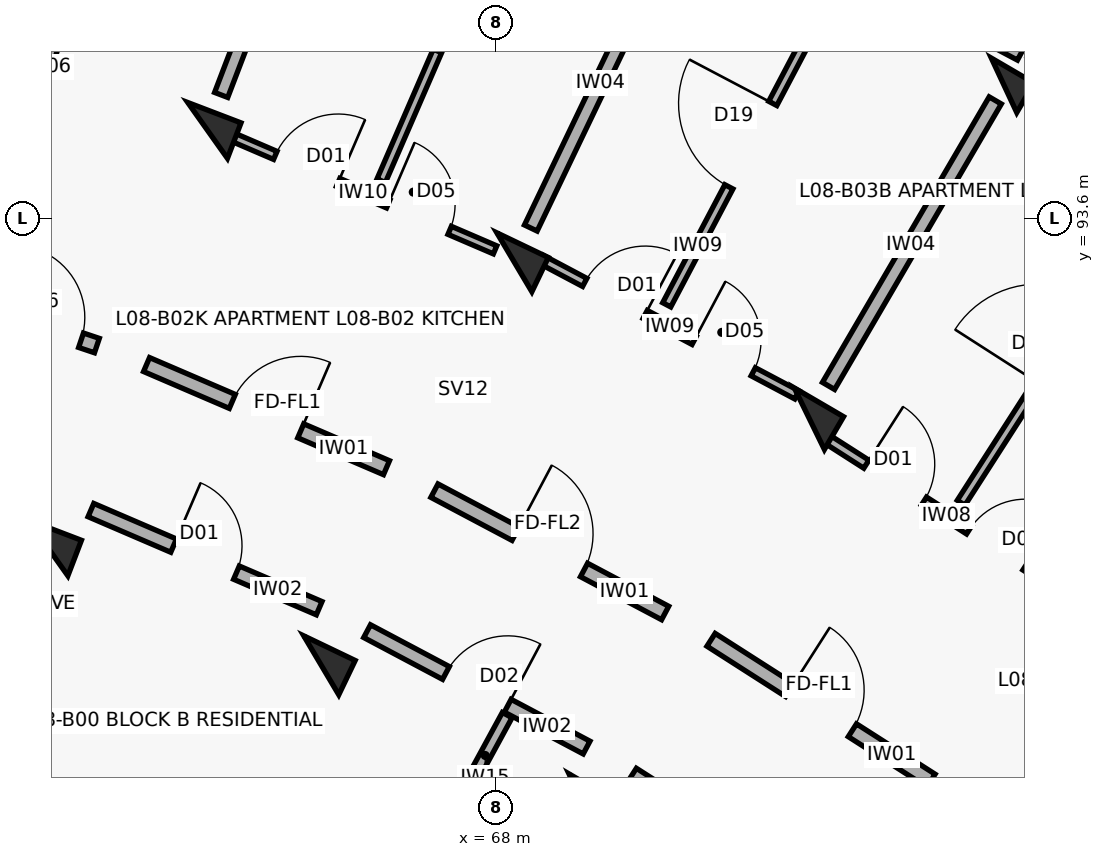
"""IFC4 building model, lengths in metres.
Left out: names, types, materials, properties, quantities, classifications, styles, units other than length and angle.
Written with IfcOpenShell. Run it as: python <this file> out.ifc"""

import sys

from ifc_helpers import new_model, si_unit, direction, frame, frame_2d, origin, origin_2d, place, context, subcontext, project, spatial, rectangle, extrude, element, fill, save


model = new_model("IFC4")
c1 = context("Model", 3, precision=1e-05, world=origin(), true_north=direction((0.0, 1.0)))
c2 = subcontext(c1, "Body", "Model", "MODEL_VIEW")
j1 = project(units=[si_unit("LENGTHUNIT", "METRE"), si_unit("PLANEANGLEUNIT", "RADIAN")], contexts=[c1])
p1 = place(None, origin())
s1 = spatial("IfcSite", under=j1, at=p1, CompositionType="ELEMENT")
p2 = place(p1, origin())
s2 = spatial("IfcBuilding", under=s1, at=p2, CompositionType="ELEMENT")
p3 = place(p2, frame((0.0, 0.0, 26.7)))
s3 = spatial("IfcBuildingStorey", under=s2, at=p3, CompositionType="ELEMENT", Elevation=26.7)
for number, where, z_axis, x_axis in (
    (1, (62.111, 89.261, 0.0), (0.0, 0.0, 1.0), (0.357, 0.934, 0.0)),
    (2, (64.21, 94.753, 0.0), (0.0, 0.0, 1.0), (0.357, 0.934, 0.0)),
    (3, (65.706, 87.716, 0.0), (0.0, 0.0, 1.0), (0.432, 0.902, 0.0)),
    (4, (68.246, 93.019, 0.0), (0.0, 0.0, 1.0), (0.432, 0.902, 0.0)),
    (5, (69.163, 85.882, 0.0), (0.0, 0.0, 1.0), (0.504, 0.864, 0.0)),
    (6, (72.127, 90.96, 0.0), (0.0, 0.0, 1.0), (0.504, 0.864, 0.0)),
):
    element("IfcColumn", number, at=place(p3, frame(where, z_axis=z_axis, x_axis=x_axis)), inside=s3, PredefinedType="COLUMN", context=c2, shape_type="SweptSolid", body=[
        extrude(rectangle(XDim=0.5, YDim=0.75, at=origin_2d()), origin(), (0.0, 0.0, 1.0), 3.1),
    ])
p4 = place(p3, frame((74.689, 95.347, 0.0), z_axis=(0.0, 0.0, 1.0), x_axis=(0.504226211181, 0.863571611366, 0.0)))
e7 = element("IfcColumn", 7, at=p4, inside=s3, PredefinedType="COLUMN", context=c2, shape_type="SweptSolid", body=[
    extrude(rectangle(XDim=0.45, YDim=0.65, at=origin_2d()), origin(), (0.0, 0.0, 1.0), 3.1),
])
p5 = place(p3, frame((70.675, 98.042, 0.0), z_axis=(0.0, 0.0, 1.0), x_axis=(0.883448093208, -0.468529045639, 0.0)))
e8 = element("IfcWall", 8, at=p5, inside=s3, PredefinedType="SOLIDWALL", context=c2, shape_type="SweptSolid", body=[
    extrude(rectangle(XDim=4.809, YDim=0.248, at=frame_2d((2.405, 0.0))), origin(), (0.0, 0.0, 1.0), 2.25),
])
p6 = place(p5, frame((0.4, 0.0, 0.0)))
e9 = element("IfcOpeningElement", 9, at=p6, cuts=e8, PredefinedType="OPENING", context=c2, shape_type="SweptSolid", body=[
    extrude(rectangle(XDim=1.1, YDim=2.15, at=frame_2d((0.55, 1.075))), frame((0.0, 0.134, 0.0), z_axis=(0.0, -1.0, 0.0), x_axis=(1.0, 0.0, 0.0)), (0.0, 0.0, 1.0), 0.268),
])
p7 = place(p5, frame((2.659, 0.0, 0.35)))
e10 = element("IfcOpeningElement", 10, at=p7, cuts=e8, PredefinedType="OPENING", context=c2, shape_type="SweptSolid", body=[
    extrude(rectangle(XDim=1.8, YDim=1.65, at=frame_2d((0.9, 0.825))), frame((0.0, 0.134, 0.0), z_axis=(0.0, -1.0, 0.0), x_axis=(1.0, 0.0, 0.0)), (0.0, 0.0, 1.0), 0.268),
])
p8 = place(p3, frame((74.961, 95.813, 0.0), z_axis=(0.0, 0.0, 1.0), x_axis=(0.504228145431, 0.863570481985, 0.0)))
e11 = element("IfcWall", 11, at=p8, inside=s3, PredefinedType="PARAPET", context=c2, shape_type="SweptSolid", body=[
    extrude(rectangle(XDim=1.53, YDim=0.195, at=frame_2d((0.765, 0.0))), origin(), (0.0, 0.0, 1.0), 2.25),
])
p9 = place(p3, frame((59.497, 93.018, 0.0), z_axis=(0.0, 0.0, 1.0), x_axis=(0.947863007629, -0.318678080151, 0.0)))
e12 = element("IfcWall", 12, at=p9, inside=s3, PredefinedType="SOLIDWALL", context=c2, shape_type="SweptSolid", body=[
    extrude(rectangle(XDim=3.436, YDim=0.2, at=frame_2d((1.718, 0.0))), origin(), (0.0, 0.0, 1.0), 2.08),
])
p10 = place(p9, frame((0.28, 0.0, 0.0)))
e13 = element("IfcOpeningElement", 13, at=p10, cuts=e12, PredefinedType="OPENING", context=c2, shape_type="SweptSolid", body=[
    extrude(rectangle(XDim=1.12, YDim=2.15, at=frame_2d((0.56, 1.075))), frame((0.0, 0.11, 0.0), z_axis=(0.0, -1.0, 0.0), x_axis=(1.0, 0.0, 0.0)), (0.0, 0.0, 1.0), 0.22),
])
p11 = place(p9, frame((2.266, 0.0, 0.0)))
e14 = element("IfcOpeningElement", 14, at=p11, cuts=e12, PredefinedType="OPENING", context=c2, shape_type="SweptSolid", body=[
    extrude(rectangle(XDim=0.95, YDim=2.1, at=frame_2d((0.475, 1.05))), frame((0.0, 0.11, 0.0), z_axis=(0.0, -1.0, 0.0), x_axis=(1.0, 0.0, 0.0)), (0.0, 0.0, 1.0), 0.22),
])
p12 = place(p3, frame((61.13, 92.724, 0.0), z_axis=(0.0, 0.0, 1.0), x_axis=(0.317204178278, 0.948357268798, 0.0)))
e15 = element("IfcWall", 15, at=p12, inside=s3, PredefinedType="PARTITIONING", context=c2, shape_type="SweptSolid", body=[
    extrude(rectangle(XDim=7.95, YDim=0.14, at=frame_2d((3.975, 0.0))), origin(), (0.0, 0.0, 1.0), 2.08),
])
p13 = place(p12, frame((6.05, 0.0, 0.0)))
e16 = element("IfcOpeningElement", 16, at=p13, cuts=e15, PredefinedType="OPENING", context=c2, shape_type="SweptSolid", body=[
    extrude(rectangle(XDim=0.92, YDim=2.1, at=frame_2d((0.46, 1.05))), frame((0.0, 0.08, 0.0), z_axis=(0.0, -1.0, 0.0), x_axis=(1.0, 0.0, 0.0)), (0.0, 0.0, 1.0), 0.16),
])
p14 = place(p3, frame((63.407, 91.673, 0.0), z_axis=(0.0, 0.0, 1.0), x_axis=(0.918718172399, -0.394913813008, 0.0)))
e17 = element("IfcWall", 17, at=p14, inside=s3, PredefinedType="SOLIDWALL", context=c2, shape_type="SweptSolid", body=[
    extrude(rectangle(XDim=3.436, YDim=0.2, at=frame_2d((1.718, 0.0))), origin(), (0.0, 0.0, 1.0), 2.08),
])
p15 = place(p14, frame((1.228, 0.0, 0.0)))
e18 = element("IfcOpeningElement", 18, at=p15, cuts=e17, PredefinedType="OPENING", context=c2, shape_type="SweptSolid", body=[
    extrude(rectangle(XDim=0.98, YDim=2.15, at=frame_2d((0.49, 1.075))), frame((0.0, 0.11, 0.0), z_axis=(0.0, -1.0, 0.0), x_axis=(1.0, 0.0, 0.0)), (0.0, 0.0, 1.0), 0.22),
])
p16 = place(p3, frame((62.675, 89.758, 0.0), z_axis=(0.0, 0.0, 1.0), x_axis=(0.918723391052, -0.394901672235, 0.0)))
e19 = element("IfcWall", 19, at=p16, inside=s3, PredefinedType="SOLIDWALL", context=c2, shape_type="SweptSolid", body=[
    extrude(rectangle(XDim=3.269, YDim=0.19, at=frame_2d((1.634, 0.0))), origin(), (0.0, 0.0, 1.0), 2.08),
])
p17 = place(p16, frame((1.184, 0.0, 0.0)))
e20 = element("IfcOpeningElement", 20, at=p17, cuts=e19, PredefinedType="OPENING", context=c2, shape_type="SweptSolid", body=[
    extrude(rectangle(XDim=0.9, YDim=2.1, at=frame_2d((0.45, 1.05))), frame((0.0, 0.105, 0.0), z_axis=(0.0, -1.0, 0.0), x_axis=(1.0, 0.0, 0.0)), (0.0, 0.0, 1.0), 0.21),
])
p18 = place(p3, frame((64.503, 94.682, 0.0), z_axis=(0.0, 0.0, 1.0), x_axis=(0.918732171064, -0.394881245253, 0.0)))
e21 = element("IfcWall", 21, at=p18, inside=s3, PredefinedType="PARTITIONING", context=c2, shape_type="SweptSolid", body=[
    extrude(rectangle(XDim=3.797, YDim=0.115, at=frame_2d((1.899, 0.0))), origin(), (0.0, 0.0, 1.0), 2.08),
])
p19 = place(p18, frame((0.65, 0.0, 0.0)))
e22 = element("IfcOpeningElement", 22, at=p19, cuts=e21, PredefinedType="OPENING", context=c2, shape_type="SweptSolid", body=[
    extrude(rectangle(XDim=0.9, YDim=2.1, at=frame_2d((0.45, 1.05))), frame((0.0, 0.067, 0.0), z_axis=(0.0, -1.0, 0.0), x_axis=(1.0, 0.0, 0.0)), (0.0, 0.0, 1.0), 0.135),
])
p20 = place(p18, frame((2.267, 0.0, 0.0)))
e23 = element("IfcOpeningElement", 23, at=p20, cuts=e21, PredefinedType="OPENING", context=c2, shape_type="SweptSolid", body=[
    extrude(rectangle(XDim=0.88, YDim=2.1, at=frame_2d((0.44, 1.05))), frame((0.0, 0.067, 0.0), z_axis=(0.0, -1.0, 0.0), x_axis=(1.0, 0.0, 0.0)), (0.0, 0.0, 1.0), 0.135),
])
p21 = place(p3, frame((66.494, 94.092, 0.0), z_axis=(0.0, 0.0, 1.0), x_axis=(0.397698322092, 0.917516236698, 0.0)))
e24 = element("IfcWall", 24, at=p21, inside=s3, PredefinedType="PARTITIONING", context=c2, shape_type="SweptSolid", body=[
    extrude(rectangle(XDim=4.9, YDim=0.12, at=frame_2d((2.45, 0.0))), origin(), (0.0, 0.0, 1.0), 2.08),
])
p22 = place(p21, frame((1.86, 0.0, 0.0)))
e25 = element("IfcOpeningElement", 25, at=p22, cuts=e24, PredefinedType="OPENING", context=c2, shape_type="SweptSolid", body=[
    extrude(rectangle(XDim=1.18, YDim=2.1, at=frame_2d((0.59, 1.05))), frame((0.0, 0.07, 0.0), z_axis=(0.0, -1.0, 0.0), x_axis=(1.0, 0.0, 0.0)), (0.0, 0.0, 1.0), 0.14),
])
p23 = place(p3, frame((64.389, 95.22, 0.0), z_axis=(0.0, 0.0, 1.0), x_axis=(0.357064016205, 0.934079915388, 0.0)))
e26 = element("IfcWall", 26, at=p23, inside=s3, PredefinedType="SOLIDWALL", context=c2, shape_type="SweptSolid", body=[
    extrude(rectangle(XDim=4.35, YDim=0.185, at=frame_2d((2.175, 0.0))), origin(), (0.0, 0.0, 1.0), 2.08),
])
p24 = place(p3, frame((67.194, 90.014, 0.0), z_axis=(0.0, 0.0, 1.0), x_axis=(0.883410853063, -0.468599258099, 0.0)))
e27 = element("IfcWall", 27, at=p24, inside=s3, PredefinedType="SOLIDWALL", context=c2, shape_type="SweptSolid", body=[
    extrude(rectangle(XDim=3.436, YDim=0.2, at=frame_2d((1.718, 0.0))), origin(), (0.0, 0.0, 1.0), 2.08),
])
p25 = place(p24, frame((1.208, 0.0, 0.0)))
e28 = element("IfcOpeningElement", 28, at=p25, cuts=e27, PredefinedType="OPENING", context=c2, shape_type="SweptSolid", body=[
    extrude(rectangle(XDim=1.02, YDim=2.15, at=frame_2d((0.51, 1.075))), frame((0.0, 0.11, 0.0), z_axis=(0.0, -1.0, 0.0), x_axis=(1.0, 0.0, 0.0)), (0.0, 0.0, 1.0), 0.22),
])
p26 = place(p3, frame((66.309, 88.165, 0.0), z_axis=(0.0, 0.0, 1.0), x_axis=(0.883444301944, -0.468536194293, 0.0)))
e29 = element("IfcWall", 29, at=p26, inside=s3, PredefinedType="SOLIDWALL", context=c2, shape_type="SweptSolid", body=[
    extrude(rectangle(XDim=3.269, YDim=0.19, at=frame_2d((1.634, 0.0))), origin(), (0.0, 0.0, 1.0), 2.08),
])
p27 = place(p26, frame((1.174, 0.0, 0.0)))
e30 = element("IfcOpeningElement", 30, at=p27, cuts=e29, PredefinedType="OPENING", context=c2, shape_type="SweptSolid", body=[
    extrude(rectangle(XDim=0.92, YDim=2.1, at=frame_2d((0.46, 1.05))), frame((0.0, 0.105, 0.0), z_axis=(0.0, -1.0, 0.0), x_axis=(1.0, 0.0, 0.0)), (0.0, 0.0, 1.0), 0.21),
])
p28 = place(p3, frame((66.575, 84.162, 0.0), z_axis=(0.0, 0.0, 1.0), x_axis=(0.477841058477, 0.878446311868, 0.0)))
e31 = element("IfcWall", 31, at=p28, inside=s3, PredefinedType="PARTITIONING", context=c2, shape_type="SweptSolid", body=[
    extrude(rectangle(XDim=3.3, YDim=0.145, at=frame_2d((1.65, 0.0))), origin(), (0.0, 0.0, 1.0), 2.08),
])
p29 = place(p28, frame((1.21, 0.0, 0.0)))
e32 = element("IfcOpeningElement", 32, at=p29, cuts=e31, PredefinedType="OPENING", context=c2, shape_type="SweptSolid", body=[
    extrude(rectangle(XDim=0.88, YDim=2.1, at=frame_2d((0.44, 1.05))), frame((0.0, 0.083, 0.0), z_axis=(0.0, -1.0, 0.0), x_axis=(1.0, 0.0, 0.0)), (0.0, 0.0, 1.0), 0.165),
])
p30 = place(p3, frame((68.598, 93.058, 0.0), z_axis=(0.0, 0.0, 1.0), x_axis=(0.883441603894, -0.468541281543, 0.0)))
e33 = element("IfcWall", 33, at=p30, inside=s3, PredefinedType="PARTITIONING", context=c2, shape_type="SweptSolid", body=[
    extrude(rectangle(XDim=3.81, YDim=0.12, at=frame_2d((1.905, 0.0))), origin(), (0.0, 0.0, 1.0), 2.08),
])
p31 = place(p30, frame((0.65, 0.0, 0.0)))
e34 = element("IfcOpeningElement", 34, at=p31, cuts=e33, PredefinedType="OPENING", context=c2, shape_type="SweptSolid", body=[
    extrude(rectangle(XDim=0.9, YDim=2.1, at=frame_2d((0.45, 1.05))), frame((0.0, 0.07, 0.0), z_axis=(0.0, -1.0, 0.0), x_axis=(1.0, 0.0, 0.0)), (0.0, 0.0, 1.0), 0.14),
])
p32 = place(p30, frame((2.28, 0.0, 0.0)))
e35 = element("IfcOpeningElement", 35, at=p32, cuts=e33, PredefinedType="OPENING", context=c2, shape_type="SweptSolid", body=[
    extrude(rectangle(XDim=0.88, YDim=2.1, at=frame_2d((0.44, 1.05))), frame((0.0, 0.07, 0.0), z_axis=(0.0, -1.0, 0.0), x_axis=(1.0, 0.0, 0.0)), (0.0, 0.0, 1.0), 0.14),
])
p33 = place(p3, frame((70.251, 92.459, 0.0), z_axis=(0.0, 0.0, 1.0), x_axis=(0.465865054936, 0.884855779542, 0.0)))
e36 = element("IfcWall", 36, at=p33, inside=s3, PredefinedType="PARTITIONING", context=c2, shape_type="SweptSolid", body=[
    extrude(rectangle(XDim=4.75, YDim=0.12, at=frame_2d((2.375, 0.0))), origin(), (0.0, 0.0, 1.0), 2.08),
])
p34 = place(p33, frame((1.755, 0.0, 0.0)))
e37 = element("IfcOpeningElement", 37, at=p34, cuts=e36, PredefinedType="OPENING", context=c2, shape_type="SweptSolid", body=[
    extrude(rectangle(XDim=1.24, YDim=2.1, at=frame_2d((0.62, 1.05))), frame((0.0, 0.07, 0.0), z_axis=(0.0, -1.0, 0.0), x_axis=(1.0, 0.0, 0.0)), (0.0, 0.0, 1.0), 0.14),
])
p35 = place(p3, frame((68.462, 93.469, 0.0), z_axis=(0.0, 0.0, 1.0), x_axis=(0.432086898897, 0.901831975371, 0.0)))
e38 = element("IfcWall", 38, at=p35, inside=s3, PredefinedType="SOLIDWALL", context=c2, shape_type="SweptSolid", body=[
    extrude(rectangle(XDim=4.35, YDim=0.185, at=frame_2d((2.175, 0.0))), origin(), (0.0, 0.0, 1.0), 2.08),
])
p36 = place(p3, frame((70.834, 88.051, 0.0), z_axis=(0.0, 0.0, 1.0), x_axis=(0.842257205985, -0.539075874963, 0.0)))
e39 = element("IfcWall", 39, at=p36, inside=s3, PredefinedType="SOLIDWALL", context=c2, shape_type="SweptSolid", body=[
    extrude(rectangle(XDim=3.436, YDim=0.2, at=frame_2d((1.718, 0.0))), origin(), (0.0, 0.0, 1.0), 2.08),
])
p37 = place(p36, frame((1.228, 0.0, 0.0)))
e40 = element("IfcOpeningElement", 40, at=p37, cuts=e39, PredefinedType="OPENING", context=c2, shape_type="SweptSolid", body=[
    extrude(rectangle(XDim=0.98, YDim=2.15, at=frame_2d((0.49, 1.075))), frame((0.0, 0.11, 0.0), z_axis=(0.0, -1.0, 0.0), x_axis=(1.0, 0.0, 0.0)), (0.0, 0.0, 1.0), 0.22),
])
p38 = place(p3, frame((69.8, 86.281, 0.0), z_axis=(0.0, 0.0, 1.0), x_axis=(0.842225276846, -0.539125758095, 0.0)))
e41 = element("IfcWall", 41, at=p38, inside=s3, PredefinedType="SOLIDWALL", context=c2, shape_type="SweptSolid", body=[
    extrude(rectangle(XDim=3.269, YDim=0.19, at=frame_2d((1.634, 0.0))), origin(), (0.0, 0.0, 1.0), 2.08),
])
p39 = place(p38, frame((1.164, 0.0, 0.0)))
e42 = element("IfcOpeningElement", 42, at=p39, cuts=e41, PredefinedType="OPENING", context=c2, shape_type="SweptSolid", body=[
    extrude(rectangle(XDim=0.94, YDim=2.1, at=frame_2d((0.47, 1.05))), frame((0.0, 0.105, 0.0), z_axis=(0.0, -1.0, 0.0), x_axis=(1.0, 0.0, 0.0)), (0.0, 0.0, 1.0), 0.21),
])
p40 = place(p3, frame((72.33, 90.712, 0.0), z_axis=(0.0, 0.0, 1.0), x_axis=(0.842245628842, -0.539093962771, 0.0)))
e43 = element("IfcWall", 43, at=p40, inside=s3, PredefinedType="PARTITIONING", context=c2, shape_type="SweptSolid", body=[
    extrude(rectangle(XDim=3.785, YDim=0.125, at=frame_2d((1.893, 0.0))), origin(), (0.0, 0.0, 1.0), 2.08),
])
p41 = place(p40, frame((0.65, 0.0, 0.0)))
e44 = element("IfcOpeningElement", 44, at=p41, cuts=e43, PredefinedType="OPENING", context=c2, shape_type="SweptSolid", body=[
    extrude(rectangle(XDim=0.9, YDim=2.1, at=frame_2d((0.45, 1.05))), frame((0.0, 0.073, 0.0), z_axis=(0.0, -1.0, 0.0), x_axis=(1.0, 0.0, 0.0)), (0.0, 0.0, 1.0), 0.145),
])
p42 = place(p40, frame((2.255, 0.0, 0.0)))
e45 = element("IfcOpeningElement", 45, at=p42, cuts=e43, PredefinedType="OPENING", context=c2, shape_type="SweptSolid", body=[
    extrude(rectangle(XDim=0.88, YDim=2.1, at=frame_2d((0.44, 1.05))), frame((0.0, 0.073, 0.0), z_axis=(0.0, -1.0, 0.0), x_axis=(1.0, 0.0, 0.0)), (0.0, 0.0, 1.0), 0.145),
])
p43 = place(p3, frame((74.124, 89.854, 0.0), z_axis=(0.0, 0.0, 1.0), x_axis=(0.5403494769, 0.84144069477, 0.0)))
e46 = element("IfcWall", 46, at=p43, inside=s3, PredefinedType="PARTITIONING", context=c2, shape_type="SweptSolid", body=[
    extrude(rectangle(XDim=5.05, YDim=0.12, at=frame_2d((2.525, 0.0))), origin(), (0.0, 0.0, 1.0), 2.08),
])
p44 = place(p43, frame((1.875, 0.0, 0.0)))
e47 = element("IfcOpeningElement", 47, at=p44, cuts=e46, PredefinedType="OPENING", context=c2, shape_type="SweptSolid", body=[
    extrude(rectangle(XDim=1.3, YDim=2.1, at=frame_2d((0.65, 1.05))), frame((0.0, 0.07, 0.0), z_axis=(0.0, -1.0, 0.0), x_axis=(1.0, 0.0, 0.0)), (0.0, 0.0, 1.0), 0.14),
])
p45 = place(p3, frame((72.379, 91.392, 0.0), z_axis=(0.0, 0.0, 1.0), x_axis=(0.504216452091, 0.863577309475, 0.0)))
e48 = element("IfcWall", 48, at=p45, inside=s3, PredefinedType="SOLIDWALL", context=c2, shape_type="SweptSolid", body=[
    extrude(rectangle(XDim=4.35, YDim=0.185, at=frame_2d((2.175, 0.0))), origin(), (0.0, 0.0, 1.0), 2.08),
])
p46 = place(p11, origin())
e49 = element("IfcDoor", 49, at=p46, inside=s3, OperationType="SINGLE_SWING_LEFT", PredefinedType="DOOR", context=c2, shape_type="SweptSolid", body=[
    extrude(rectangle(XDim=0.95, YDim=2.1, at=frame_2d((0.475, 1.05))), frame((0.0, 0.025, 0.0), z_axis=(0.0, -1.0, 0.0), x_axis=(1.0, 0.0, 0.0)), (0.0, 0.0, 1.0), 0.05),
])
fill(e14, e49)
p47 = place(p15, origin())
e50 = element("IfcDoor", 50, at=p47, inside=s3, OperationType="SINGLE_SWING_RIGHT", PredefinedType="DOOR", context=c2, shape_type="SweptSolid", body=[
    extrude(rectangle(XDim=0.98, YDim=2.15, at=frame_2d((0.49, 1.075))), frame((0.0, 0.025, 0.0), z_axis=(0.0, -1.0, 0.0), x_axis=(1.0, 0.0, 0.0)), (0.0, 0.0, 1.0), 0.05),
])
fill(e18, e50)
p48 = place(p17, origin())
e51 = element("IfcDoor", 51, at=p48, inside=s3, OperationType="SINGLE_SWING_LEFT", PredefinedType="DOOR", context=c2, shape_type="SweptSolid", body=[
    extrude(rectangle(XDim=0.9, YDim=2.1, at=frame_2d((0.45, 1.05))), frame((0.0, 0.025, 0.0), z_axis=(0.0, -1.0, 0.0), x_axis=(1.0, 0.0, 0.0)), (0.0, 0.0, 1.0), 0.05),
])
fill(e20, e51)
p49 = place(p19, origin())
e52 = element("IfcDoor", 52, at=p49, inside=s3, OperationType="SINGLE_SWING_RIGHT", PredefinedType="DOOR", context=c2, shape_type="SweptSolid", body=[
    extrude(rectangle(XDim=0.9, YDim=2.1, at=frame_2d((0.45, 1.05))), frame((0.0, 0.025, 0.0), z_axis=(0.0, -1.0, 0.0), x_axis=(1.0, 0.0, 0.0)), (0.0, 0.0, 1.0), 0.05),
])
fill(e22, e52)
p50 = place(p20, origin())
e53 = element("IfcDoor", 53, at=p50, inside=s3, OperationType="SINGLE_SWING_LEFT", PredefinedType="DOOR", context=c2, shape_type="SweptSolid", body=[
    extrude(rectangle(XDim=0.88, YDim=2.1, at=frame_2d((0.44, 1.05))), frame((0.0, 0.025, 0.0), z_axis=(0.0, -1.0, 0.0), x_axis=(1.0, 0.0, 0.0)), (0.0, 0.0, 1.0), 0.05),
])
fill(e23, e53)
p51 = place(p25, origin())
e54 = element("IfcDoor", 54, at=p51, inside=s3, OperationType="SINGLE_SWING_LEFT", PredefinedType="DOOR", context=c2, shape_type="SweptSolid", body=[
    extrude(rectangle(XDim=1.02, YDim=2.15, at=frame_2d((0.51, 1.075))), frame((0.0, 0.025, 0.0), z_axis=(0.0, -1.0, 0.0), x_axis=(1.0, 0.0, 0.0)), (0.0, 0.0, 1.0), 0.05),
])
fill(e28, e54)
p52 = place(p27, origin())
e55 = element("IfcDoor", 55, at=p52, inside=s3, OperationType="SINGLE_SWING_RIGHT", PredefinedType="DOOR", context=c2, shape_type="SweptSolid", body=[
    extrude(rectangle(XDim=0.92, YDim=2.1, at=frame_2d((0.46, 1.05))), frame((0.0, 0.025, 0.0), z_axis=(0.0, -1.0, 0.0), x_axis=(1.0, 0.0, 0.0)), (0.0, 0.0, 1.0), 0.05),
])
fill(e30, e55)
p53 = place(p31, origin())
e56 = element("IfcDoor", 56, at=p53, inside=s3, OperationType="SINGLE_SWING_RIGHT", PredefinedType="DOOR", context=c2, shape_type="SweptSolid", body=[
    extrude(rectangle(XDim=0.9, YDim=2.1, at=frame_2d((0.45, 1.05))), frame((0.0, 0.025, 0.0), z_axis=(0.0, -1.0, 0.0), x_axis=(1.0, 0.0, 0.0)), (0.0, 0.0, 1.0), 0.05),
])
fill(e34, e56)
p54 = place(p32, origin())
e57 = element("IfcDoor", 57, at=p54, inside=s3, OperationType="SINGLE_SWING_LEFT", PredefinedType="DOOR", context=c2, shape_type="SweptSolid", body=[
    extrude(rectangle(XDim=0.88, YDim=2.1, at=frame_2d((0.44, 1.05))), frame((0.0, 0.025, 0.0), z_axis=(0.0, -1.0, 0.0), x_axis=(1.0, 0.0, 0.0)), (0.0, 0.0, 1.0), 0.05),
])
fill(e35, e57)
p55 = place(p34, origin())
e58 = element("IfcDoor", 58, at=p55, inside=s3, OperationType="SINGLE_SWING_RIGHT", PredefinedType="DOOR", context=c2, shape_type="SweptSolid", body=[
    extrude(rectangle(XDim=1.24, YDim=2.1, at=frame_2d((0.62, 1.05))), frame((0.0, 0.025, 0.0), z_axis=(0.0, -1.0, 0.0), x_axis=(1.0, 0.0, 0.0)), (0.0, 0.0, 1.0), 0.05),
])
fill(e37, e58)
p56 = place(p37, origin())
e59 = element("IfcDoor", 59, at=p56, inside=s3, OperationType="SINGLE_SWING_LEFT", PredefinedType="DOOR", context=c2, shape_type="SweptSolid", body=[
    extrude(rectangle(XDim=0.98, YDim=2.15, at=frame_2d((0.49, 1.075))), frame((0.0, 0.025, 0.0), z_axis=(0.0, -1.0, 0.0), x_axis=(1.0, 0.0, 0.0)), (0.0, 0.0, 1.0), 0.05),
])
fill(e40, e59)
p57 = place(p41, origin())
e60 = element("IfcDoor", 60, at=p57, inside=s3, OperationType="SINGLE_SWING_LEFT", PredefinedType="DOOR", context=c2, shape_type="SweptSolid", body=[
    extrude(rectangle(XDim=0.9, YDim=2.1, at=frame_2d((0.45, 1.05))), frame((0.0, 0.025, 0.0), z_axis=(0.0, -1.0, 0.0), x_axis=(1.0, 0.0, 0.0)), (0.0, 0.0, 1.0), 0.05),
])
fill(e44, e60)
p58 = place(p42, origin())
e61 = element("IfcDoor", 61, at=p58, inside=s3, OperationType="SINGLE_SWING_RIGHT", PredefinedType="DOOR", context=c2, shape_type="SweptSolid", body=[
    extrude(rectangle(XDim=0.88, YDim=2.1, at=frame_2d((0.44, 1.05))), frame((0.0, 0.025, 0.0), z_axis=(0.0, -1.0, 0.0), x_axis=(1.0, 0.0, 0.0)), (0.0, 0.0, 1.0), 0.05),
])
fill(e45, e61)
save(model, sys.argv[1])
